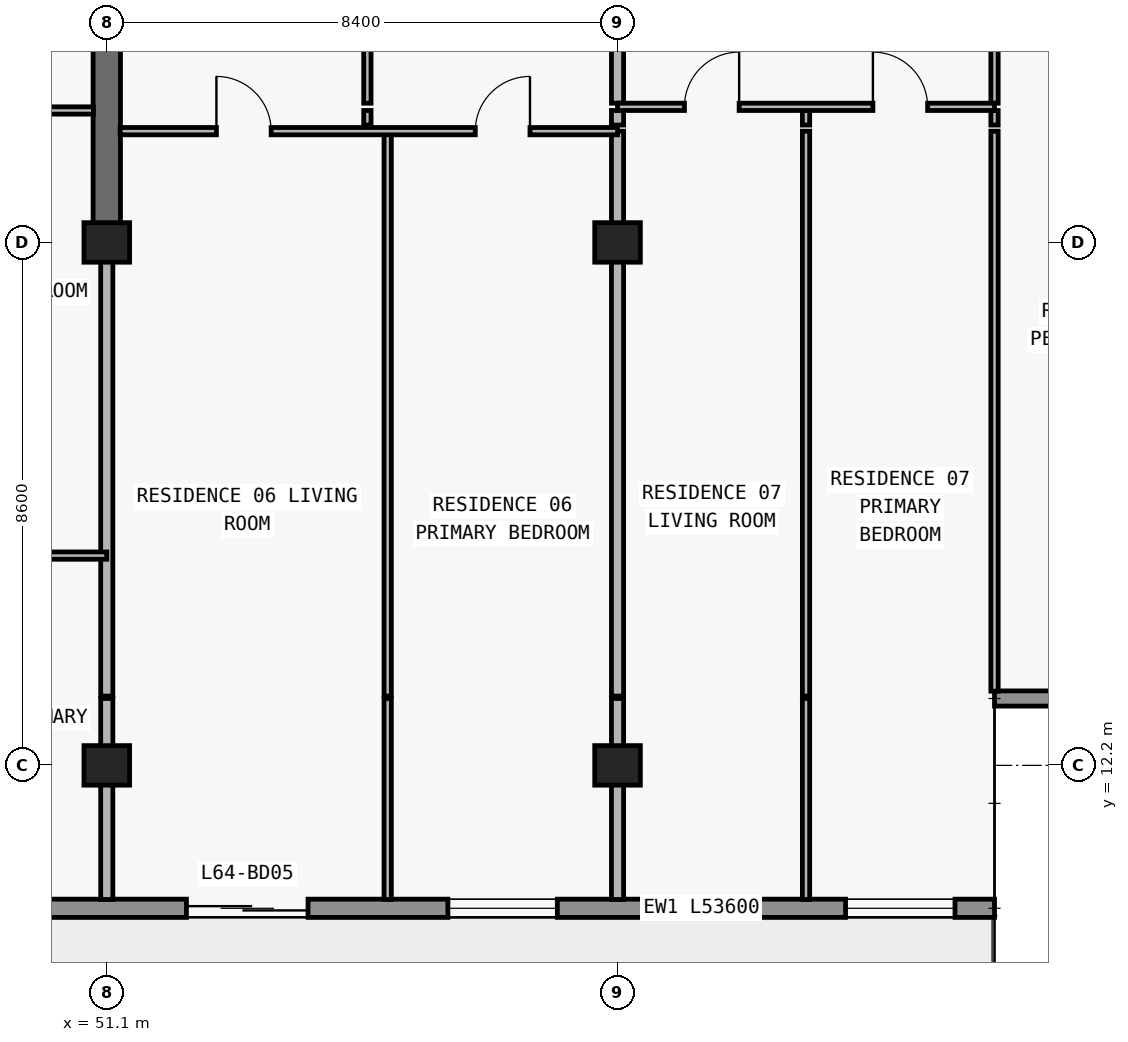
"""IFC4 building model, lengths in metres.
Left out: names, types, materials, properties, quantities, classifications, styles, units other than length and angle.
Written with IfcOpenShell. Run it as: python <this file> out.ifc"""

import sys

from ifc_helpers import new_model, si_unit, direction, frame, frame_2d, origin, origin_2d, place, context, subcontext, project, spatial, rectangle, extrude, element, fill, save


model = new_model("IFC4")
c1 = context("Model", 3, precision=1e-05, world=origin(), true_north=direction((0.0, 1.0)))
c2 = subcontext(c1, "Body", "Model", "MODEL_VIEW")
j1 = project(units=[si_unit("LENGTHUNIT", "METRE"), si_unit("PLANEANGLEUNIT", "RADIAN")], contexts=[c1])
p1 = place(None, origin())
s1 = spatial("IfcSite", under=j1, at=p1, CompositionType="ELEMENT")
p2 = place(p1, origin())
s2 = spatial("IfcBuilding", under=s1, at=p2, CompositionType="ELEMENT")
p3 = place(p2, frame((0.0, 0.0, 229.8)))
s3 = spatial("IfcBuildingStorey", under=s2, at=p3, CompositionType="ELEMENT", Elevation=229.8)
for number, where, z_axis, x_axis in (
    (1, (51.1, 12.2, 0.0), (0.0, 0.0, 1.0), (1.0, 0.0, 0.0)),
    (2, (59.5, 12.2, 0.0), (0.0, 0.0, 1.0), (1.0, 0.0, 0.0)),
    (3, (51.1, 20.8, 0.0), (0.0, 0.0, 1.0), (1.0, 0.0, 0.0)),
    (4, (59.5, 20.8, 0.0), (0.0, 0.0, 1.0), (1.0, 0.0, 0.0)),
):
    element("IfcColumn", number, at=place(p3, frame(where, z_axis=z_axis, x_axis=x_axis)), inside=s3, PredefinedType="COLUMN", context=c2, shape_type="SweptSolid", body=[
        extrude(rectangle(XDim=0.75, YDim=0.65, at=origin_2d()), origin(), (0.0, 0.0, 1.0), 3.05),
    ])
p4 = place(p3, frame((51.1, 20.8, 0.0), z_axis=(0.0, 0.0, 1.0), x_axis=(0.0, 1.0, 0.0)))
e5 = element("IfcWall", 5, at=p4, inside=s3, PredefinedType="SHEAR", context=c2, shape_type="SweptSolid", body=[
    extrude(rectangle(XDim=8.6, YDim=0.45, at=frame_2d((4.3, 0.0))), origin(), (0.0, 0.0, 1.0), 3.05),
])
p5 = place(p3, frame((65.7, 9.85, 0.0), z_axis=(0.0, 0.0, 1.0), x_axis=(-1.0, 0.0, 0.0)))
e6 = element("IfcWall", 6, at=p5, inside=s3, PredefinedType="STANDARD", context=c2, shape_type="SweptSolid", body=[
    extrude(rectangle(XDim=53.6, YDim=0.3, at=frame_2d((26.8, 0.0))), origin(), (0.0, 0.0, 1.0), 3.05),
])
p6 = place(p5, frame((48.05, 0.0, 0.85)))
e7 = element("IfcOpeningElement", 7, at=p6, cuts=e6, PredefinedType="OPENING", context=c2, shape_type="SweptSolid", body=[
    extrude(rectangle(XDim=1.8, YDim=1.55, at=frame_2d((0.9, 0.775))), frame((0.0, 0.16, 0.0), z_axis=(0.0, -1.0, 0.0), x_axis=(1.0, 0.0, 0.0)), (0.0, 0.0, 1.0), 0.32),
])
p7 = place(p5, frame((44.09, 0.0, 0.0)))
e8 = element("IfcOpeningElement", 8, at=p7, cuts=e6, PredefinedType="OPENING", context=c2, shape_type="SweptSolid", body=[
    extrude(rectangle(XDim=2.0, YDim=2.3, at=frame_2d((1.0, 1.15))), frame((0.0, 0.16, 0.0), z_axis=(0.0, -1.0, 0.0), x_axis=(1.0, 0.0, 0.0)), (0.0, 0.0, 1.0), 0.32),
])
p8 = place(p5, frame((39.99, 0.0, 0.85)))
e9 = element("IfcOpeningElement", 9, at=p8, cuts=e6, PredefinedType="OPENING", context=c2, shape_type="SweptSolid", body=[
    extrude(rectangle(XDim=1.8, YDim=1.55, at=frame_2d((0.9, 0.775))), frame((0.0, 0.16, 0.0), z_axis=(0.0, -1.0, 0.0), x_axis=(1.0, 0.0, 0.0)), (0.0, 0.0, 1.0), 0.32),
])
p9 = place(p5, frame((36.026, 0.0, 0.0)))
e10 = element("IfcOpeningElement", 10, at=p9, cuts=e6, PredefinedType="OPENING", context=c2, shape_type="SweptSolid", body=[
    extrude(rectangle(XDim=2.0, YDim=2.3, at=frame_2d((1.0, 1.15))), frame((0.0, 0.16, 0.0), z_axis=(0.0, -1.0, 0.0), x_axis=(1.0, 0.0, 0.0)), (0.0, 0.0, 1.0), 0.32),
])
p10 = place(p5, frame((31.726, 0.0, 0.85)))
e11 = element("IfcOpeningElement", 11, at=p10, cuts=e6, PredefinedType="OPENING", context=c2, shape_type="SweptSolid", body=[
    extrude(rectangle(XDim=2.2, YDim=1.55, at=frame_2d((1.1, 0.775))), frame((0.0, 0.16, 0.0), z_axis=(0.0, -1.0, 0.0), x_axis=(1.0, 0.0, 0.0)), (0.0, 0.0, 1.0), 0.32),
])
p11 = place(p5, frame((27.51, 0.0, 0.0)))
e12 = element("IfcOpeningElement", 12, at=p11, cuts=e6, PredefinedType="OPENING", context=c2, shape_type="SweptSolid", body=[
    extrude(rectangle(XDim=2.0, YDim=2.3, at=frame_2d((1.0, 1.15))), frame((0.0, 0.16, 0.0), z_axis=(0.0, -1.0, 0.0), x_axis=(1.0, 0.0, 0.0)), (0.0, 0.0, 1.0), 0.32),
])
p12 = place(p5, frame((23.81, 0.0, 0.85)))
e13 = element("IfcOpeningElement", 13, at=p12, cuts=e6, PredefinedType="OPENING", context=c2, shape_type="SweptSolid", body=[
    extrude(rectangle(XDim=1.8, YDim=1.55, at=frame_2d((0.9, 0.775))), frame((0.0, 0.16, 0.0), z_axis=(0.0, -1.0, 0.0), x_axis=(1.0, 0.0, 0.0)), (0.0, 0.0, 1.0), 0.32),
])
p13 = place(p5, frame((20.026, 0.0, 0.0)))
e14 = element("IfcOpeningElement", 14, at=p13, cuts=e6, PredefinedType="OPENING", context=c2, shape_type="SweptSolid", body=[
    extrude(rectangle(XDim=2.0, YDim=2.3, at=frame_2d((1.0, 1.15))), frame((0.0, 0.16, 0.0), z_axis=(0.0, -1.0, 0.0), x_axis=(1.0, 0.0, 0.0)), (0.0, 0.0, 1.0), 0.32),
])
p14 = place(p5, frame((15.726, 0.0, 0.85)))
e15 = element("IfcOpeningElement", 15, at=p14, cuts=e6, PredefinedType="OPENING", context=c2, shape_type="SweptSolid", body=[
    extrude(rectangle(XDim=2.2, YDim=1.55, at=frame_2d((1.1, 0.775))), frame((0.0, 0.16, 0.0), z_axis=(0.0, -1.0, 0.0), x_axis=(1.0, 0.0, 0.0)), (0.0, 0.0, 1.0), 0.32),
])
p15 = place(p5, frame((11.29, 0.0, 0.0)))
e16 = element("IfcOpeningElement", 16, at=p15, cuts=e6, PredefinedType="OPENING", context=c2, shape_type="SweptSolid", body=[
    extrude(rectangle(XDim=2.0, YDim=2.3, at=frame_2d((1.0, 1.15))), frame((0.0, 0.16, 0.0), z_axis=(0.0, -1.0, 0.0), x_axis=(1.0, 0.0, 0.0)), (0.0, 0.0, 1.0), 0.32),
])
p16 = place(p5, frame((7.19, 0.0, 0.85)))
e17 = element("IfcOpeningElement", 17, at=p16, cuts=e6, PredefinedType="OPENING", context=c2, shape_type="SweptSolid", body=[
    extrude(rectangle(XDim=1.8, YDim=1.55, at=frame_2d((0.9, 0.775))), frame((0.0, 0.16, 0.0), z_axis=(0.0, -1.0, 0.0), x_axis=(1.0, 0.0, 0.0)), (0.0, 0.0, 1.0), 0.32),
])
p17 = place(p5, frame((0.65, 0.0, 0.85)))
e18 = element("IfcOpeningElement", 18, at=p17, cuts=e6, PredefinedType="OPENING", context=c2, shape_type="SweptSolid", body=[
    extrude(rectangle(XDim=1.8, YDim=1.55, at=frame_2d((0.9, 0.775))), frame((0.0, 0.16, 0.0), z_axis=(0.0, -1.0, 0.0), x_axis=(1.0, 0.0, 0.0)), (0.0, 0.0, 1.0), 0.32),
])
p18 = place(p3, frame((65.7, 13.3, 0.0), z_axis=(0.0, 0.0, 1.0), x_axis=(1.0, 0.0, 0.0)))
e19 = element("IfcWall", 19, at=p18, inside=s3, PredefinedType="ELEMENTEDWALL", context=c2, shape_type="SweptSolid", body=[
    extrude(rectangle(XDim=3.85, YDim=0.25, at=frame_2d((1.925, 0.0))), origin(), (0.0, 0.0, 1.0), 3.05),
])
p19 = place(p3, frame((51.1, 9.995, 0.0), z_axis=(0.0, 0.0, 1.0), x_axis=(0.0, 1.0, 0.0)))
e20 = element("IfcWall", 20, at=p19, inside=s3, PredefinedType="PARTITIONING", context=c2, shape_type="SweptSolid", body=[
    extrude(rectangle(XDim=3.305, YDim=0.2, at=frame_2d((1.652, 0.0))), origin(), (0.0, 0.0, 1.0), 2.263),
])
p20 = place(p3, frame((51.1, 13.34, 0.0), z_axis=(0.0, 0.0, 1.0), x_axis=(0.0, 1.0, 0.0)))
e21 = element("IfcWall", 21, at=p20, inside=s3, PredefinedType="PARTITIONING", context=c2, shape_type="SweptSolid", body=[
    extrude(rectangle(XDim=7.455, YDim=0.2, at=frame_2d((3.728, 0.0))), origin(), (0.0, 0.0, 1.0), 2.263),
])
p21 = place(p3, frame((55.386, 22.73, 0.0), z_axis=(0.0, 0.0, 1.0), x_axis=(0.0, 1.0, 0.0)))
e22 = element("IfcWall", 22, at=p21, inside=s3, PredefinedType="PARTITIONING", context=c2, shape_type="SweptSolid", body=[
    extrude(rectangle(XDim=0.24, YDim=0.12, at=frame_2d((0.12, 0.0))), origin(), (0.0, 0.0, 1.0), 3.05),
])
p22 = place(p3, frame((55.386, 23.09, 0.0), z_axis=(0.0, 0.0, 1.0), x_axis=(0.0, 1.0, 0.0)))
e23 = element("IfcWall", 23, at=p22, inside=s3, PredefinedType="PARTITIONING", context=c2, shape_type="SweptSolid", body=[
    extrude(rectangle(XDim=4.69, YDim=0.12, at=frame_2d((2.345, 0.0))), origin(), (0.0, 0.0, 1.0), 3.05),
])
p23 = place(p22, frame((1.895, 0.0, 0.0)))
e24 = element("IfcOpeningElement", 24, at=p23, cuts=e23, PredefinedType="OPENING", context=c2, shape_type="SweptSolid", body=[
    extrude(rectangle(XDim=0.9, YDim=2.15, at=frame_2d((0.45, 1.075))), frame((0.0, 0.07, 0.0), z_axis=(0.0, -1.0, 0.0), x_axis=(1.0, 0.0, 0.0)), (0.0, 0.0, 1.0), 0.14),
])
p24 = place(p3, frame((55.72, 9.995, 0.0), z_axis=(0.0, 0.0, 1.0), x_axis=(0.0, 1.0, 0.0)))
e25 = element("IfcWall", 25, at=p24, inside=s3, PredefinedType="PARTITIONING", context=c2, shape_type="SweptSolid", body=[
    extrude(rectangle(XDim=3.305, YDim=0.12, at=frame_2d((1.652, 0.0))), origin(), (0.0, 0.0, 1.0), 3.05),
])
p25 = place(p3, frame((55.72, 13.34, 0.0), z_axis=(0.0, 0.0, 1.0), x_axis=(0.0, 1.0, 0.0)))
e26 = element("IfcWall", 26, at=p25, inside=s3, PredefinedType="PARTITIONING", context=c2, shape_type="SweptSolid", body=[
    extrude(rectangle(XDim=9.29, YDim=0.12, at=frame_2d((4.645, 0.0))), origin(), (0.0, 0.0, 1.0), 3.05),
])
p26 = place(p3, frame((59.5, 9.995, 0.0), z_axis=(0.0, 0.0, 1.0), x_axis=(0.0, 1.0, 0.0)))
e27 = element("IfcWall", 27, at=p26, inside=s3, PredefinedType="PARTITIONING", context=c2, shape_type="SweptSolid", body=[
    extrude(rectangle(XDim=3.305, YDim=0.2, at=frame_2d((1.652, 0.0))), origin(), (0.0, 0.0, 1.0), 2.263),
])
p27 = place(p3, frame((59.5, 13.34, 0.0), z_axis=(0.0, 0.0, 1.0), x_axis=(0.0, 1.0, 0.0)))
e28 = element("IfcWall", 28, at=p27, inside=s3, PredefinedType="PARTITIONING", context=c2, shape_type="SweptSolid", body=[
    extrude(rectangle(XDim=9.29, YDim=0.2, at=frame_2d((4.645, 0.0))), origin(), (0.0, 0.0, 1.0), 2.263),
])
p28 = place(p3, frame((59.5, 22.73, 0.0), z_axis=(0.0, 0.0, 1.0), x_axis=(0.0, 1.0, 0.0)))
e29 = element("IfcWall", 29, at=p28, inside=s3, PredefinedType="PARTITIONING", context=c2, shape_type="SweptSolid", body=[
    extrude(rectangle(XDim=0.24, YDim=0.2, at=frame_2d((0.12, 0.0))), origin(), (0.0, 0.0, 1.0), 2.263),
])
p29 = place(p3, frame((59.5, 23.09, 0.0), z_axis=(0.0, 0.0, 1.0), x_axis=(0.0, 1.0, 0.0)))
e30 = element("IfcWall", 30, at=p29, inside=s3, PredefinedType="PARTITIONING", context=c2, shape_type="SweptSolid", body=[
    extrude(rectangle(XDim=4.69, YDim=0.2, at=frame_2d((2.345, 0.0))), origin(), (0.0, 0.0, 1.0), 2.263),
])
p30 = place(p3, frame((62.6, 9.995, 0.0), z_axis=(0.0, 0.0, 1.0), x_axis=(0.0, 1.0, 0.0)))
e31 = element("IfcWall", 31, at=p30, inside=s3, PredefinedType="PARTITIONING", context=c2, shape_type="SweptSolid", body=[
    extrude(rectangle(XDim=3.305, YDim=0.12, at=frame_2d((1.652, 0.0))), origin(), (0.0, 0.0, 1.0), 3.05),
])
p31 = place(p3, frame((62.6, 13.34, 0.0), z_axis=(0.0, 0.0, 1.0), x_axis=(0.0, 1.0, 0.0)))
e32 = element("IfcWall", 32, at=p31, inside=s3, PredefinedType="PARTITIONING", context=c2, shape_type="SweptSolid", body=[
    extrude(rectangle(XDim=9.29, YDim=0.12, at=frame_2d((4.645, 0.0))), origin(), (0.0, 0.0, 1.0), 3.05),
])
p32 = place(p3, frame((62.6, 22.73, 0.0), z_axis=(0.0, 0.0, 1.0), x_axis=(0.0, 1.0, 0.0)))
e33 = element("IfcWall", 33, at=p32, inside=s3, PredefinedType="PARTITIONING", context=c2, shape_type="SweptSolid", body=[
    extrude(rectangle(XDim=0.24, YDim=0.12, at=frame_2d((0.12, 0.0))), origin(), (0.0, 0.0, 1.0), 3.05),
])
p33 = place(p3, frame((65.7, 13.42, 0.0), z_axis=(0.0, 0.0, 1.0), x_axis=(0.0, 1.0, 0.0)))
e34 = element("IfcWall", 34, at=p33, inside=s3, PredefinedType="PARTITIONING", context=c2, shape_type="SweptSolid", body=[
    extrude(rectangle(XDim=9.21, YDim=0.12, at=frame_2d((4.605, 0.0))), origin(), (0.0, 0.0, 1.0), 3.05),
])
p34 = place(p3, frame((65.7, 22.73, 0.0), z_axis=(0.0, 0.0, 1.0), x_axis=(0.0, 1.0, 0.0)))
e35 = element("IfcWall", 35, at=p34, inside=s3, PredefinedType="PARTITIONING", context=c2, shape_type="SweptSolid", body=[
    extrude(rectangle(XDim=0.24, YDim=0.12, at=frame_2d((0.12, 0.0))), origin(), (0.0, 0.0, 1.0), 3.05),
])
p35 = place(p3, frame((65.7, 23.09, 0.0), z_axis=(0.0, 0.0, 1.0), x_axis=(0.0, 1.0, 0.0)))
e36 = element("IfcWall", 36, at=p35, inside=s3, PredefinedType="PARTITIONING", context=c2, shape_type="SweptSolid", body=[
    extrude(rectangle(XDim=4.69, YDim=0.12, at=frame_2d((2.345, 0.0))), origin(), (0.0, 0.0, 1.0), 3.05),
])
p36 = place(p35, frame((1.895, 0.0, 0.0)))
e37 = element("IfcOpeningElement", 37, at=p36, cuts=e36, PredefinedType="OPENING", context=c2, shape_type="SweptSolid", body=[
    extrude(rectangle(XDim=0.9, YDim=2.15, at=frame_2d((0.45, 1.075))), frame((0.0, 0.07, 0.0), z_axis=(0.0, -1.0, 0.0), x_axis=(1.0, 0.0, 0.0)), (0.0, 0.0, 1.0), 0.14),
])
p37 = place(p3, frame((46.648, 15.65, 0.0), z_axis=(0.0, 0.0, 1.0), x_axis=(1.0, 0.0, 0.0)))
e38 = element("IfcWall", 38, at=p37, inside=s3, PredefinedType="PARTITIONING", context=c2, shape_type="SweptSolid", body=[
    extrude(rectangle(XDim=4.452, YDim=0.12, at=frame_2d((2.226, 0.0))), origin(), (0.0, 0.0, 1.0), 3.05),
])
p38 = place(p37, frame((1.776, 0.0, 0.0)))
e39 = element("IfcOpeningElement", 39, at=p38, cuts=e38, PredefinedType="OPENING", context=c2, shape_type="SweptSolid", body=[
    extrude(rectangle(XDim=0.9, YDim=2.15, at=frame_2d((0.45, 1.075))), frame((0.0, 0.07, 0.0), z_axis=(0.0, -1.0, 0.0), x_axis=(1.0, 0.0, 0.0)), (0.0, 0.0, 1.0), 0.14),
])
p39 = place(p3, frame((51.32, 22.63, 0.0), z_axis=(0.0, 0.0, 1.0), x_axis=(1.0, 0.0, 0.0)))
e40 = element("IfcWall", 40, at=p39, inside=s3, PredefinedType="PARTITIONING", context=c2, shape_type="SweptSolid", body=[
    extrude(rectangle(XDim=8.18, YDim=0.12, at=frame_2d((4.09, 0.0))), origin(), (0.0, 0.0, 1.0), 3.05),
])
p40 = place(p39, frame((1.583, 0.0, 0.0)))
e41 = element("IfcOpeningElement", 41, at=p40, cuts=e40, PredefinedType="OPENING", context=c2, shape_type="SweptSolid", body=[
    extrude(rectangle(XDim=0.9, YDim=2.15, at=frame_2d((0.45, 1.075))), frame((0.0, 0.07, 0.0), z_axis=(0.0, -1.0, 0.0), x_axis=(1.0, 0.0, 0.0)), (0.0, 0.0, 1.0), 0.14),
])
p41 = place(p39, frame((5.84, 0.0, 0.0)))
e42 = element("IfcOpeningElement", 42, at=p41, cuts=e40, PredefinedType="OPENING", context=c2, shape_type="SweptSolid", body=[
    extrude(rectangle(XDim=0.9, YDim=2.15, at=frame_2d((0.45, 1.075))), frame((0.0, 0.07, 0.0), z_axis=(0.0, -1.0, 0.0), x_axis=(1.0, 0.0, 0.0)), (0.0, 0.0, 1.0), 0.14),
])
p42 = place(p3, frame((42.7, 22.97, 0.0), z_axis=(0.0, 0.0, 1.0), x_axis=(1.0, 0.0, 0.0)))
e43 = element("IfcWall", 43, at=p42, inside=s3, PredefinedType="PARTITIONING", context=c2, shape_type="SweptSolid", body=[
    extrude(rectangle(XDim=8.18, YDim=0.12, at=frame_2d((4.09, 0.0))), origin(), (0.0, 0.0, 1.0), 3.05),
])
p43 = place(p42, frame((1.524, 0.0, 0.0)))
e44 = element("IfcOpeningElement", 44, at=p43, cuts=e43, PredefinedType="OPENING", context=c2, shape_type="SweptSolid", body=[
    extrude(rectangle(XDim=0.9, YDim=2.15, at=frame_2d((0.45, 1.075))), frame((0.0, 0.07, 0.0), z_axis=(0.0, -1.0, 0.0), x_axis=(1.0, 0.0, 0.0)), (0.0, 0.0, 1.0), 0.14),
])
p44 = place(p42, frame((6.033, 0.0, 0.0)))
e45 = element("IfcOpeningElement", 45, at=p44, cuts=e43, PredefinedType="OPENING", context=c2, shape_type="SweptSolid", body=[
    extrude(rectangle(XDim=0.9, YDim=2.15, at=frame_2d((0.45, 1.075))), frame((0.0, 0.07, 0.0), z_axis=(0.0, -1.0, 0.0), x_axis=(1.0, 0.0, 0.0)), (0.0, 0.0, 1.0), 0.14),
])
p45 = place(p3, frame((59.5, 23.03, 0.0), z_axis=(0.0, 0.0, 1.0), x_axis=(1.0, 0.0, 0.0)))
e46 = element("IfcWall", 46, at=p45, inside=s3, PredefinedType="PARTITIONING", context=c2, shape_type="SweptSolid", body=[
    extrude(rectangle(XDim=6.2, YDim=0.12, at=frame_2d((3.1, 0.0))), origin(), (0.0, 0.0, 1.0), 3.05),
])
p46 = place(p45, frame((1.1, 0.0, 0.0)))
e47 = element("IfcOpeningElement", 47, at=p46, cuts=e46, PredefinedType="OPENING", context=c2, shape_type="SweptSolid", body=[
    extrude(rectangle(XDim=0.9, YDim=2.15, at=frame_2d((0.45, 1.075))), frame((0.0, 0.07, 0.0), z_axis=(0.0, -1.0, 0.0), x_axis=(1.0, 0.0, 0.0)), (0.0, 0.0, 1.0), 0.14),
])
p47 = place(p45, frame((4.2, 0.0, 0.0)))
e48 = element("IfcOpeningElement", 48, at=p47, cuts=e46, PredefinedType="OPENING", context=c2, shape_type="SweptSolid", body=[
    extrude(rectangle(XDim=0.9, YDim=2.15, at=frame_2d((0.45, 1.075))), frame((0.0, 0.07, 0.0), z_axis=(0.0, -1.0, 0.0), x_axis=(1.0, 0.0, 0.0)), (0.0, 0.0, 1.0), 0.14),
])
p48 = place(p15, origin())
e49 = element("IfcDoor", 49, at=p48, inside=s3, OperationType="DOUBLE_DOOR_SLIDING", PredefinedType="DOOR", context=c2, shape_type="SweptSolid", body=[
    extrude(rectangle(XDim=2.0, YDim=2.3, at=frame_2d((1.0, 1.15))), frame((0.0, 0.025, 0.0), z_axis=(0.0, -1.0, 0.0), x_axis=(1.0, 0.0, 0.0)), (0.0, 0.0, 1.0), 0.05),
])
fill(e16, e49)
p49 = place(p16, origin())
e50 = element("IfcWindow", 50, at=p49, inside=s3, PartitioningType="SINGLE_PANEL", PredefinedType="WINDOW", context=c2, shape_type="SweptSolid", body=[
    extrude(rectangle(XDim=1.8, YDim=1.55, at=frame_2d((0.9, 0.775))), frame((0.0, 0.03, 0.0), z_axis=(0.0, -1.0, 0.0), x_axis=(1.0, 0.0, 0.0)), (0.0, 0.0, 1.0), 0.06),
])
fill(e17, e50)
p50 = place(p17, origin())
e51 = element("IfcWindow", 51, at=p50, inside=s3, PartitioningType="SINGLE_PANEL", PredefinedType="WINDOW", context=c2, shape_type="SweptSolid", body=[
    extrude(rectangle(XDim=1.8, YDim=1.55, at=frame_2d((0.9, 0.775))), frame((0.0, 0.03, 0.0), z_axis=(0.0, -1.0, 0.0), x_axis=(1.0, 0.0, 0.0)), (0.0, 0.0, 1.0), 0.06),
])
fill(e18, e51)
p51 = place(p40, origin())
e52 = element("IfcDoor", 52, at=p51, inside=s3, OperationType="SINGLE_SWING_LEFT", PredefinedType="DOOR", context=c2, shape_type="SweptSolid", body=[
    extrude(rectangle(XDim=0.9, YDim=2.15, at=frame_2d((0.45, 1.075))), frame((0.0, 0.025, 0.0), z_axis=(0.0, -1.0, 0.0), x_axis=(1.0, 0.0, 0.0)), (0.0, 0.0, 1.0), 0.05),
])
fill(e41, e52)
p52 = place(p41, origin())
e53 = element("IfcDoor", 53, at=p52, inside=s3, OperationType="SINGLE_SWING_RIGHT", PredefinedType="DOOR", context=c2, shape_type="SweptSolid", body=[
    extrude(rectangle(XDim=0.9, YDim=2.15, at=frame_2d((0.45, 1.075))), frame((0.0, 0.025, 0.0), z_axis=(0.0, -1.0, 0.0), x_axis=(1.0, 0.0, 0.0)), (0.0, 0.0, 1.0), 0.05),
])
fill(e42, e53)
p53 = place(p46, origin())
e54 = element("IfcDoor", 54, at=p53, inside=s3, OperationType="SINGLE_SWING_RIGHT", PredefinedType="DOOR", context=c2, shape_type="SweptSolid", body=[
    extrude(rectangle(XDim=0.9, YDim=2.15, at=frame_2d((0.45, 1.075))), frame((0.0, 0.025, 0.0), z_axis=(0.0, -1.0, 0.0), x_axis=(1.0, 0.0, 0.0)), (0.0, 0.0, 1.0), 0.05),
])
fill(e47, e54)
p54 = place(p47, origin())
e55 = element("IfcDoor", 55, at=p54, inside=s3, OperationType="SINGLE_SWING_LEFT", PredefinedType="DOOR", context=c2, shape_type="SweptSolid", body=[
    extrude(rectangle(XDim=0.9, YDim=2.15, at=frame_2d((0.45, 1.075))), frame((0.0, 0.025, 0.0), z_axis=(0.0, -1.0, 0.0), x_axis=(1.0, 0.0, 0.0)), (0.0, 0.0, 1.0), 0.05),
])
fill(e48, e55)
save(model, sys.argv[1])
